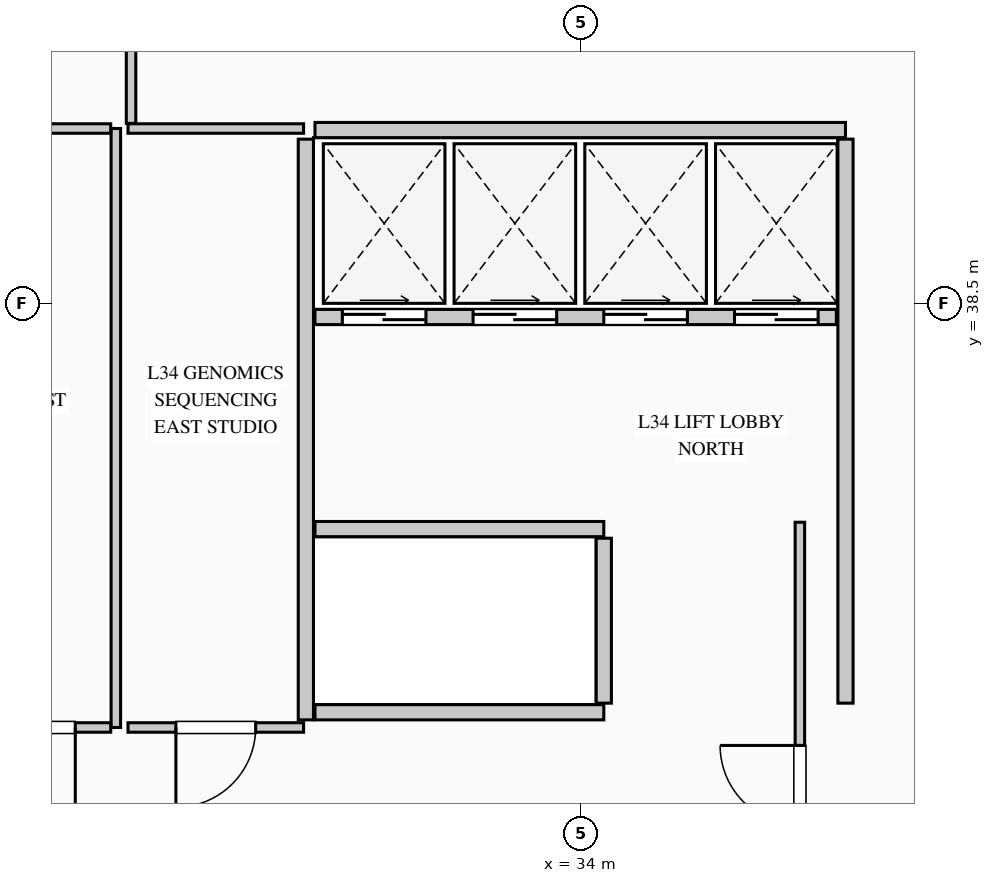
"""IFC4 building model, lengths in metres.
Left out: names, types, materials, properties, quantities, classifications, styles, units other than length and angle.
Written with IfcOpenShell. Run it as: python <this file> out.ifc"""

import sys

from ifc_helpers import new_model, si_unit, direction, frame, frame_2d, origin, place, context, subcontext, project, spatial, rectangle, extrude, element, fill, save


model = new_model("IFC4")
c1 = context("Model", 3, precision=1e-05, world=origin(), true_north=direction((0.0, 1.0)))
c2 = subcontext(c1, "Body", "Model", "MODEL_VIEW")
j1 = project(units=[si_unit("LENGTHUNIT", "METRE"), si_unit("PLANEANGLEUNIT", "RADIAN")], contexts=[c1])
p1 = place(None, origin())
s1 = spatial("IfcSite", under=j1, at=p1, CompositionType="ELEMENT")
p2 = place(p1, origin())
s2 = spatial("IfcBuilding", under=s1, at=p2, CompositionType="ELEMENT")
p3 = place(p2, frame((0.0, 0.0, 146.95)))
s3 = spatial("IfcBuildingStorey", under=s2, at=p3, CompositionType="ELEMENT", Elevation=146.95)
p4 = place(p3, frame((30.38, 33.02, 0.0), z_axis=(0.0, 0.0, 1.0), x_axis=(0.0, 1.0, 0.0)))
e1 = element("IfcWall", 1, at=p4, inside=s3, PredefinedType="PARTITIONING", context=c2, shape_type="SweptSolid", body=[
    extrude(rectangle(XDim=7.64, YDim=0.2, at=frame_2d((3.82, 0.0))), origin(), (0.0, 0.0, 1.0), 3.69),
])
p5 = place(p3, frame((30.5, 40.78, 0.0), z_axis=(0.0, 0.0, 1.0), x_axis=(1.0, 0.0, 0.0)))
e2 = element("IfcWall", 2, at=p5, inside=s3, PredefinedType="PARTITIONING", context=c2, shape_type="SweptSolid", body=[
    extrude(rectangle(XDim=6.98, YDim=0.2, at=frame_2d((3.49, 0.0))), origin(), (0.0, 0.0, 1.0), 3.69),
])
p6 = place(p3, frame((37.48, 33.24, 0.0), z_axis=(0.0, 0.0, 1.0), x_axis=(0.0, 1.0, 0.0)))
e3 = element("IfcWall", 3, at=p6, inside=s3, PredefinedType="PARTITIONING", context=c2, shape_type="SweptSolid", body=[
    extrude(rectangle(XDim=7.42, YDim=0.2, at=frame_2d((3.71, 0.0))), origin(), (0.0, 0.0, 1.0), 3.69),
])
p7 = place(p3, frame((30.5, 38.32, 0.0), z_axis=(0.0, 0.0, 1.0), x_axis=(1.0, 0.0, 0.0)))
e4 = element("IfcWall", 4, at=p7, inside=s3, PredefinedType="PARTITIONING", context=c2, shape_type="SweptSolid", body=[
    extrude(rectangle(XDim=6.86, YDim=0.2, at=frame_2d((3.43, 0.0))), origin(), (0.0, 0.0, 1.0), 3.69),
])
p8 = place(p7, frame((0.36, 0.0, 0.0)))
e5 = element("IfcOpeningElement", 5, at=p8, cuts=e4, PredefinedType="OPENING", context=c2, shape_type="SweptSolid", body=[
    extrude(rectangle(XDim=1.1, YDim=2.2, at=frame_2d((0.55, 1.1))), frame((0.0, 0.11, 0.0), z_axis=(0.0, -1.0, 0.0), x_axis=(1.0, 0.0, 0.0)), (0.0, 0.0, 1.0), 0.22),
])
p9 = place(p7, frame((2.08, 0.0, 0.0)))
e6 = element("IfcOpeningElement", 6, at=p9, cuts=e4, PredefinedType="OPENING", context=c2, shape_type="SweptSolid", body=[
    extrude(rectangle(XDim=1.1, YDim=2.2, at=frame_2d((0.55, 1.1))), frame((0.0, 0.11, 0.0), z_axis=(0.0, -1.0, 0.0), x_axis=(1.0, 0.0, 0.0)), (0.0, 0.0, 1.0), 0.22),
])
p10 = place(p7, frame((3.8, 0.0, 0.0)))
e7 = element("IfcOpeningElement", 7, at=p10, cuts=e4, PredefinedType="OPENING", context=c2, shape_type="SweptSolid", body=[
    extrude(rectangle(XDim=1.1, YDim=2.2, at=frame_2d((0.55, 1.1))), frame((0.0, 0.11, 0.0), z_axis=(0.0, -1.0, 0.0), x_axis=(1.0, 0.0, 0.0)), (0.0, 0.0, 1.0), 0.22),
])
p11 = place(p7, frame((5.52, 0.0, 0.0)))
e8 = element("IfcOpeningElement", 8, at=p11, cuts=e4, PredefinedType="OPENING", context=c2, shape_type="SweptSolid", body=[
    extrude(rectangle(XDim=1.1, YDim=2.2, at=frame_2d((0.55, 1.1))), frame((0.0, 0.11, 0.0), z_axis=(0.0, -1.0, 0.0), x_axis=(1.0, 0.0, 0.0)), (0.0, 0.0, 1.0), 0.22),
])
for number, where, z_axis, x_axis in (
    (9, (30.5, 35.53, 0.0), (0.0, 0.0, 1.0), (1.0, 0.0, 0.0)),
    (10, (30.5, 33.12, 0.0), (0.0, 0.0, 1.0), (1.0, 0.0, 0.0)),
):
    element("IfcWall", number, at=place(p3, frame(where, z_axis=z_axis, x_axis=x_axis)), inside=s3, PredefinedType="PARTITIONING", context=c2, shape_type="SweptSolid", body=[
        extrude(rectangle(XDim=3.8, YDim=0.2, at=frame_2d((1.9, 0.0))), origin(), (0.0, 0.0, 1.0), 3.69),
    ])
p12 = place(p3, frame((34.3, 33.24, 0.0), z_axis=(0.0, 0.0, 1.0), x_axis=(0.0, 1.0, 0.0)))
e11 = element("IfcWall", 11, at=p12, inside=s3, PredefinedType="PARTITIONING", context=c2, shape_type="SweptSolid", body=[
    extrude(rectangle(XDim=2.17, YDim=0.2, at=frame_2d((1.085, 0.0))), origin(), (0.0, 0.0, 1.0), 3.69),
])
p13 = place(p3, frame((27.88, 40.8, 0.0), z_axis=(0.0, 0.0, 1.0), x_axis=(0.0, -1.0, 0.0)))
e12 = element("IfcWall", 12, at=p13, inside=s3, PredefinedType="PARTITIONING", context=c2, shape_type="SweptSolid", body=[
    extrude(rectangle(XDim=7.88, YDim=0.125, at=frame_2d((3.94, 0.0))), origin(), (0.0, 0.0, 1.0), 3.69),
])
p14 = place(p3, frame((27.812, 32.92, 0.0), z_axis=(0.0, 0.0, 1.0), x_axis=(-1.0, 0.0, 0.0)))
e13 = element("IfcWall", 13, at=p14, inside=s3, PredefinedType="PARTITIONING", context=c2, shape_type="SweptSolid", body=[
    extrude(rectangle(XDim=3.762, YDim=0.125, at=frame_2d((1.881, 0.0))), origin(), (0.0, 0.0, 1.0), 3.69),
])
p15 = place(p14, frame((0.466, 0.0, 0.0)))
e14 = element("IfcOpeningElement", 14, at=p15, cuts=e13, PredefinedType="OPENING", context=c2, shape_type="SweptSolid", body=[
    extrude(rectangle(XDim=1.05, YDim=2.15, at=frame_2d((0.525, 1.075))), frame((0.0, 0.073, 0.0), z_axis=(0.0, -1.0, 0.0), x_axis=(1.0, 0.0, 0.0)), (0.0, 0.0, 1.0), 0.145),
])
p16 = place(p3, frame((24.117, 40.8, 0.0), z_axis=(0.0, 0.0, 1.0), x_axis=(1.0, 0.0, 0.0)))
e15 = element("IfcWall", 15, at=p16, inside=s3, PredefinedType="PARTITIONING", context=c2, shape_type="SweptSolid", body=[
    extrude(rectangle(XDim=3.695, YDim=0.125, at=frame_2d((1.848, 0.0))), origin(), (0.0, 0.0, 1.0), 3.69),
])
p17 = place(p3, frame((30.35, 32.92, 0.0), z_axis=(0.0, 0.0, 1.0), x_axis=(-1.0, 0.0, 0.0)))
e16 = element("IfcWall", 16, at=p17, inside=s3, PredefinedType="PARTITIONING", context=c2, shape_type="SweptSolid", body=[
    extrude(rectangle(XDim=2.31, YDim=0.125, at=frame_2d((1.155, 0.0))), origin(), (0.0, 0.0, 1.0), 3.69),
])
p18 = place(p17, frame((0.63, 0.0, 0.0)))
e17 = element("IfcOpeningElement", 17, at=p18, cuts=e16, PredefinedType="OPENING", context=c2, shape_type="SweptSolid", body=[
    extrude(rectangle(XDim=1.05, YDim=2.15, at=frame_2d((0.525, 1.075))), frame((0.0, 0.073, 0.0), z_axis=(0.0, -1.0, 0.0), x_axis=(1.0, 0.0, 0.0)), (0.0, 0.0, 1.0), 0.145),
])
p19 = place(p3, frame((28.04, 40.8, 0.0), z_axis=(0.0, 0.0, 1.0), x_axis=(1.0, 0.0, 0.0)))
e18 = element("IfcWall", 18, at=p19, inside=s3, PredefinedType="PARTITIONING", context=c2, shape_type="SweptSolid", body=[
    extrude(rectangle(XDim=2.31, YDim=0.125, at=frame_2d((1.155, 0.0))), origin(), (0.0, 0.0, 1.0), 3.69),
])
p20 = place(p3, frame((36.88, 28.698, 0.0), z_axis=(0.0, 0.0, 1.0), x_axis=(0.0, 1.0, 0.0)))
e19 = element("IfcWall", 19, at=p20, inside=s3, PredefinedType="PARTITIONING", context=c2, shape_type="SweptSolid", body=[
    extrude(rectangle(XDim=6.923, YDim=0.125, at=frame_2d((3.461, 0.0))), origin(), (0.0, 0.0, 1.0), 3.69),
])
p21 = place(p20, frame((2.936, 0.0, 0.0)))
e20 = element("IfcOpeningElement", 20, at=p21, cuts=e19, PredefinedType="OPENING", context=c2, shape_type="SweptSolid", body=[
    extrude(rectangle(XDim=1.05, YDim=2.15, at=frame_2d((0.525, 1.075))), frame((0.0, 0.073, 0.0), z_axis=(0.0, -1.0, 0.0), x_axis=(1.0, 0.0, 0.0)), (0.0, 0.0, 1.0), 0.145),
])
p22 = place(p3, frame((28.08, 40.867, 0.0), z_axis=(0.0, 0.0, 1.0), x_axis=(0.0, 1.0, 0.0)))
e21 = element("IfcWall", 21, at=p22, inside=s3, PredefinedType="PARTITIONING", context=c2, shape_type="SweptSolid", body=[
    extrude(rectangle(XDim=2.397, YDim=0.125, at=frame_2d((1.199, 0.0))), origin(), (0.0, 0.0, 1.0), 3.69),
])
p23 = place(p8, origin())
e22 = element("IfcDoor", 22, at=p23, inside=s3, OperationType="DOUBLE_DOOR_SLIDING", PredefinedType="DOOR", context=c2, shape_type="SweptSolid", body=[
    extrude(rectangle(XDim=1.1, YDim=2.2, at=frame_2d((0.55, 1.1))), frame((0.0, 0.025, 0.0), z_axis=(0.0, -1.0, 0.0), x_axis=(1.0, 0.0, 0.0)), (0.0, 0.0, 1.0), 0.05),
])
fill(e5, e22)
p24 = place(p9, origin())
e23 = element("IfcDoor", 23, at=p24, inside=s3, OperationType="DOUBLE_DOOR_SLIDING", PredefinedType="DOOR", context=c2, shape_type="SweptSolid", body=[
    extrude(rectangle(XDim=1.1, YDim=2.2, at=frame_2d((0.55, 1.1))), frame((0.0, 0.025, 0.0), z_axis=(0.0, -1.0, 0.0), x_axis=(1.0, 0.0, 0.0)), (0.0, 0.0, 1.0), 0.05),
])
fill(e6, e23)
p25 = place(p10, origin())
e24 = element("IfcDoor", 24, at=p25, inside=s3, OperationType="DOUBLE_DOOR_SLIDING", PredefinedType="DOOR", context=c2, shape_type="SweptSolid", body=[
    extrude(rectangle(XDim=1.1, YDim=2.2, at=frame_2d((0.55, 1.1))), frame((0.0, 0.025, 0.0), z_axis=(0.0, -1.0, 0.0), x_axis=(1.0, 0.0, 0.0)), (0.0, 0.0, 1.0), 0.05),
])
fill(e7, e24)
p26 = place(p11, origin())
e25 = element("IfcDoor", 25, at=p26, inside=s3, OperationType="DOUBLE_DOOR_SLIDING", PredefinedType="DOOR", context=c2, shape_type="SweptSolid", body=[
    extrude(rectangle(XDim=1.1, YDim=2.2, at=frame_2d((0.55, 1.1))), frame((0.0, 0.025, 0.0), z_axis=(0.0, -1.0, 0.0), x_axis=(1.0, 0.0, 0.0)), (0.0, 0.0, 1.0), 0.05),
])
fill(e8, e25)
p27 = place(p15, origin())
e26 = element("IfcDoor", 26, at=p27, inside=s3, OperationType="SINGLE_SWING_LEFT", PredefinedType="DOOR", context=c2, shape_type="SweptSolid", body=[
    extrude(rectangle(XDim=1.05, YDim=2.15, at=frame_2d((0.525, 1.075))), frame((0.0, 0.025, 0.0), z_axis=(0.0, -1.0, 0.0), x_axis=(1.0, 0.0, 0.0)), (0.0, 0.0, 1.0), 0.05),
])
fill(e14, e26)
p28 = place(p18, origin())
e27 = element("IfcDoor", 27, at=p28, inside=s3, OperationType="SINGLE_SWING_RIGHT", PredefinedType="DOOR", context=c2, shape_type="SweptSolid", body=[
    extrude(rectangle(XDim=1.05, YDim=2.15, at=frame_2d((0.525, 1.075))), frame((0.0, 0.025, 0.0), z_axis=(0.0, -1.0, 0.0), x_axis=(1.0, 0.0, 0.0)), (0.0, 0.0, 1.0), 0.05),
])
fill(e17, e27)
p29 = place(p21, origin())
e28 = element("IfcDoor", 28, at=p29, inside=s3, OperationType="SINGLE_SWING_RIGHT", PredefinedType="DOOR", context=c2, shape_type="SweptSolid", body=[
    extrude(rectangle(XDim=1.05, YDim=2.15, at=frame_2d((0.525, 1.075))), frame((0.0, 0.025, 0.0), z_axis=(0.0, -1.0, 0.0), x_axis=(1.0, 0.0, 0.0)), (0.0, 0.0, 1.0), 0.05),
])
fill(e20, e28)
save(model, sys.argv[1])
